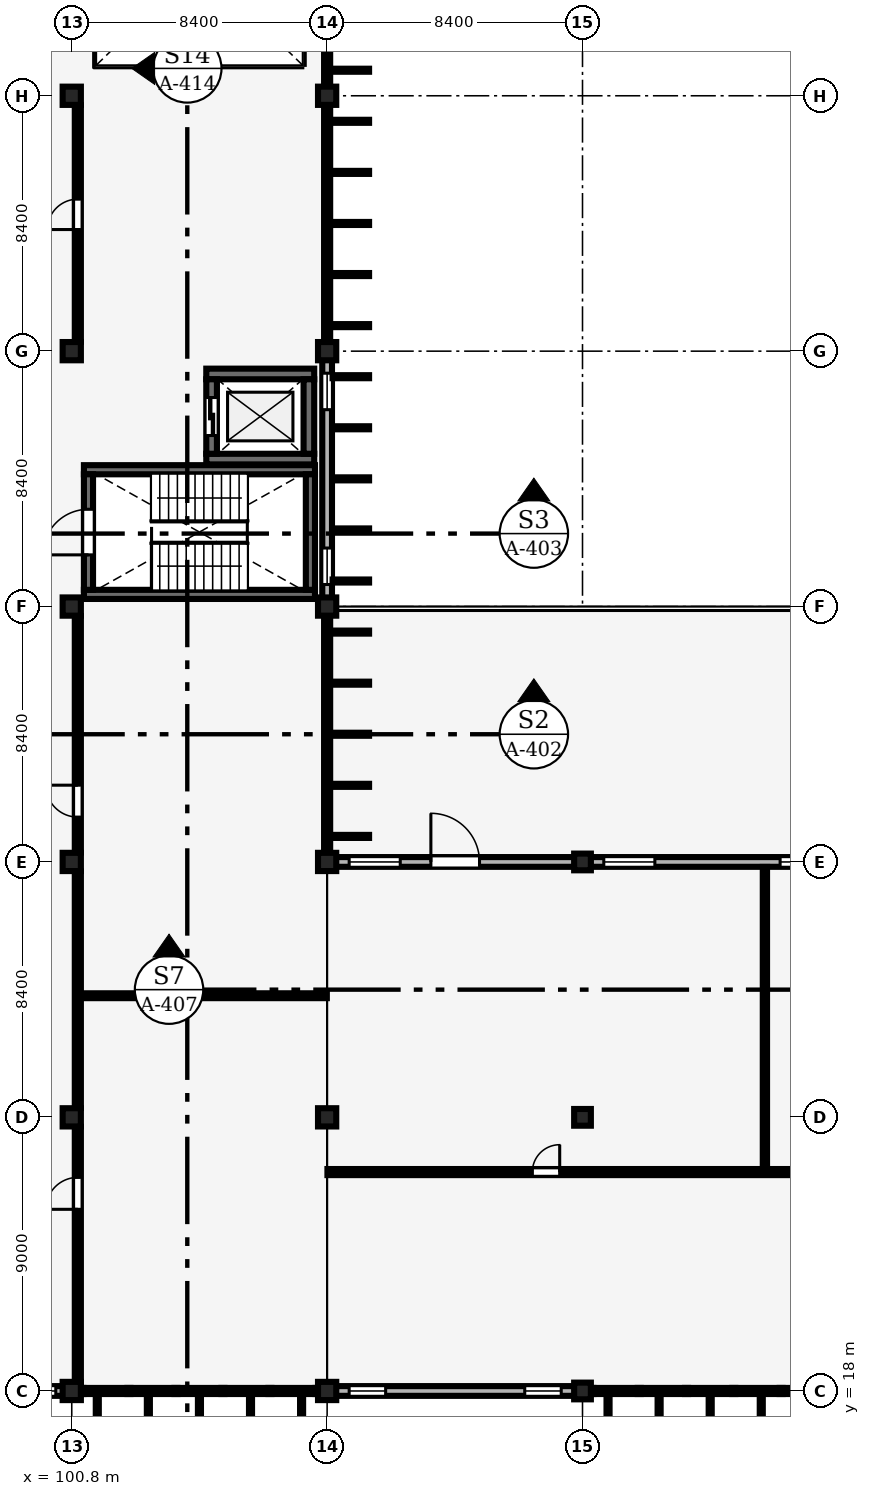
"""IFC4 building model, lengths in metres.
Left out: names, types, materials, properties, quantities, classifications, styles, units other than length and angle.
Written with IfcOpenShell. Run it as: python <this file> out.ifc"""

import sys

from ifc_helpers import new_model, si_unit, direction, frame, frame_2d, origin, origin_2d, place, context, subcontext, project, spatial, rectangle, extrude, element, fill, save


model = new_model("IFC4")
c1 = context("Model", 3, precision=1e-05, world=origin(), true_north=direction((0.0, 1.0)))
c2 = subcontext(c1, "Body", "Model", "MODEL_VIEW")
j1 = project(units=[si_unit("LENGTHUNIT", "METRE"), si_unit("PLANEANGLEUNIT", "RADIAN")], contexts=[c1])
p1 = place(None, origin())
s1 = spatial("IfcSite", under=j1, at=p1, CompositionType="ELEMENT")
p2 = place(p1, origin())
s2 = spatial("IfcBuilding", under=s1, at=p2, CompositionType="ELEMENT")
p3 = place(p2, frame((0.0, 0.0, 9.0)))
s3 = spatial("IfcBuildingStorey", under=s2, at=p3, CompositionType="ELEMENT", Elevation=9.0)
for number, where, z_axis, x_axis in (
    (1, (100.8, 18.0, 0.0), (0.0, 0.0, 1.0), (1.0, 0.0, 0.0)),
    (2, (100.8, 27.0, 0.0), (0.0, 0.0, 1.0), (1.0, 0.0, 0.0)),
    (3, (100.8, 35.4, 0.0), (0.0, 0.0, 1.0), (1.0, 0.0, 0.0)),
    (4, (100.8, 43.8, 0.0), (0.0, 0.0, 1.0), (1.0, 0.0, 0.0)),
    (5, (100.8, 52.2, 0.0), (0.0, 0.0, 1.0), (1.0, 0.0, 0.0)),
    (6, (100.8, 60.6, 0.0), (0.0, 0.0, 1.0), (1.0, 0.0, 0.0)),
    (7, (109.2, 18.0, 0.0), (0.0, 0.0, 1.0), (1.0, 0.0, 0.0)),
    (8, (109.2, 27.0, 0.0), (0.0, 0.0, 1.0), (1.0, 0.0, 0.0)),
    (9, (109.2, 35.4, 0.0), (0.0, 0.0, 1.0), (1.0, 0.0, 0.0)),
    (10, (109.2, 43.8, 0.0), (0.0, 0.0, 1.0), (1.0, 0.0, 0.0)),
    (11, (109.2, 52.2, 0.0), (0.0, 0.0, 1.0), (1.0, 0.0, 0.0)),
    (12, (109.2, 60.6, 0.0), (0.0, 0.0, 1.0), (1.0, 0.0, 0.0)),
):
    element("IfcColumn", number, at=place(p3, frame(where, z_axis=z_axis, x_axis=x_axis)), inside=s3, PredefinedType="COLUMN", context=c2, shape_type="SweptSolid", body=[
        extrude(rectangle(XDim=0.6, YDim=0.6, at=origin_2d()), origin(), (0.0, 0.0, 1.0), 4.2),
    ])
for number, where, z_axis, x_axis in (
    (13, (117.6, 18.0, 0.0), (0.0, 0.0, 1.0), (1.0, 0.0, 0.0)),
    (14, (117.6, 27.0, 0.0), (0.0, 0.0, 1.0), (1.0, 0.0, 0.0)),
    (15, (117.6, 35.4, 0.0), (0.0, 0.0, 1.0), (1.0, 0.0, 0.0)),
):
    element("IfcColumn", number, at=place(p3, frame(where, z_axis=z_axis, x_axis=x_axis)), inside=s3, PredefinedType="COLUMN", context=c2, shape_type="SweptSolid", body=[
        extrude(rectangle(XDim=0.55, YDim=0.55, at=origin_2d()), origin(), (0.0, 0.0, 1.0), 4.2),
    ])
p4 = place(p3, frame((109.475, 35.4, 0.0), z_axis=(0.0, 0.0, 1.0), x_axis=(1.0, 0.0, 0.0)))
e16 = element("IfcWall", 16, at=p4, inside=s3, PredefinedType="SOLIDWALL", context=c2, shape_type="SweptSolid", body=[
    extrude(rectangle(XDim=7.875, YDim=0.32, at=frame_2d((3.938, 0.0))), origin(), (0.0, 0.0, 1.0), 3.48),
])
p5 = place(p4, frame((3.137, 0.0, 0.0)))
e17 = element("IfcOpeningElement", 17, at=p5, cuts=e16, PredefinedType="OPENING", context=c2, shape_type="SweptSolid", body=[
    extrude(rectangle(XDim=1.6, YDim=2.3, at=frame_2d((0.8, 1.15))), frame((0.0, 0.17, 0.0), z_axis=(0.0, -1.0, 0.0), x_axis=(1.0, 0.0, 0.0)), (0.0, 0.0, 1.0), 0.34),
])
p6 = place(p4, frame((0.45, 0.0, 0.95)))
e18 = element("IfcOpeningElement", 18, at=p6, cuts=e16, PredefinedType="OPENING", context=c2, shape_type="SweptSolid", body=[
    extrude(rectangle(XDim=1.68, YDim=1.8, at=frame_2d((0.84, 0.9))), frame((0.0, 0.17, 0.0), z_axis=(0.0, -1.0, 0.0), x_axis=(1.0, 0.0, 0.0)), (0.0, 0.0, 1.0), 0.34),
])
p7 = place(p3, frame((117.85, 35.4, 0.0), z_axis=(0.0, 0.0, 1.0), x_axis=(1.0, 0.0, 0.0)))
e19 = element("IfcWall", 19, at=p7, inside=s3, PredefinedType="SOLIDWALL", context=c2, shape_type="SweptSolid", body=[
    extrude(rectangle(XDim=7.9, YDim=0.32, at=frame_2d((3.95, 0.0))), origin(), (0.0, 0.0, 1.0), 3.43),
])
p8 = place(p7, frame((0.45, 0.0, 0.9)))
e20 = element("IfcOpeningElement", 20, at=p8, cuts=e19, PredefinedType="OPENING", context=c2, shape_type="SweptSolid", body=[
    extrude(rectangle(XDim=1.68, YDim=2.4, at=frame_2d((0.84, 1.2))), frame((0.0, 0.17, 0.0), z_axis=(0.0, -1.0, 0.0), x_axis=(1.0, 0.0, 0.0)), (0.0, 0.0, 1.0), 0.34),
])
p9 = place(p7, frame((6.25, 0.0, 0.9)))
e21 = element("IfcOpeningElement", 21, at=p9, cuts=e19, PredefinedType="OPENING", context=c2, shape_type="SweptSolid", body=[
    extrude(rectangle(XDim=1.2, YDim=1.5, at=frame_2d((0.6, 0.75))), frame((0.0, 0.17, 0.0), z_axis=(0.0, -1.0, 0.0), x_axis=(1.0, 0.0, 0.0)), (0.0, 0.0, 1.0), 0.34),
])
p10 = place(p3, frame((109.2, 44.075, 0.0), z_axis=(0.0, 0.0, 1.0), x_axis=(0.0, 1.0, 0.0)))
e22 = element("IfcWall", 22, at=p10, inside=s3, PredefinedType="SOLIDWALL", context=c2, shape_type="SweptSolid", body=[
    extrude(rectangle(XDim=7.85, YDim=0.32, at=frame_2d((3.925, 0.0))), origin(), (0.0, 0.0, 1.0), 3.34),
])
p11 = place(p10, frame((0.45, 0.0, 0.85)))
e23 = element("IfcOpeningElement", 23, at=p11, cuts=e22, PredefinedType="OPENING", context=c2, shape_type="SweptSolid", body=[
    extrude(rectangle(XDim=1.2, YDim=1.8, at=frame_2d((0.6, 0.9))), frame((0.0, 0.17, 0.0), z_axis=(0.0, -1.0, 0.0), x_axis=(1.0, 0.0, 0.0)), (0.0, 0.0, 1.0), 0.34),
])
p12 = place(p10, frame((6.2, 0.0, 0.85)))
e24 = element("IfcOpeningElement", 24, at=p12, cuts=e22, PredefinedType="OPENING", context=c2, shape_type="SweptSolid", body=[
    extrude(rectangle(XDim=1.2, YDim=1.8, at=frame_2d((0.6, 0.9))), frame((0.0, 0.17, 0.0), z_axis=(0.0, -1.0, 0.0), x_axis=(1.0, 0.0, 0.0)), (0.0, 0.0, 1.0), 0.34),
])
p13 = place(p3, frame((92.675, 18.0, 0.0), z_axis=(0.0, 0.0, 1.0), x_axis=(1.0, 0.0, 0.0)))
e25 = element("IfcWall", 25, at=p13, inside=s3, PredefinedType="SOLIDWALL", context=c2, shape_type="SweptSolid", body=[
    extrude(rectangle(XDim=7.85, YDim=0.32, at=frame_2d((3.925, 0.0))), origin(), (0.0, 0.0, 1.0), 3.18),
])
p14 = place(p13, frame((0.45, 0.0, 0.9)))
e26 = element("IfcOpeningElement", 26, at=p14, cuts=e25, PredefinedType="OPENING", context=c2, shape_type="SweptSolid", body=[
    extrude(rectangle(XDim=1.2, YDim=1.8, at=frame_2d((0.6, 0.9))), frame((0.0, 0.17, 0.0), z_axis=(0.0, -1.0, 0.0), x_axis=(1.0, 0.0, 0.0)), (0.0, 0.0, 1.0), 0.34),
])
p15 = place(p13, frame((5.92, 0.0, 0.9)))
e27 = element("IfcOpeningElement", 27, at=p15, cuts=e25, PredefinedType="OPENING", context=c2, shape_type="SweptSolid", body=[
    extrude(rectangle(XDim=1.68, YDim=2.13, at=frame_2d((0.84, 1.065))), frame((0.0, 0.17, 0.0), z_axis=(0.0, -1.0, 0.0), x_axis=(1.0, 0.0, 0.0)), (0.0, 0.0, 1.0), 0.34),
])
p16 = place(p3, frame((109.475, 18.0, 0.0), z_axis=(0.0, 0.0, 1.0), x_axis=(1.0, 0.0, 0.0)))
e28 = element("IfcWall", 28, at=p16, inside=s3, PredefinedType="SOLIDWALL", context=c2, shape_type="SweptSolid", body=[
    extrude(rectangle(XDim=7.875, YDim=0.32, at=frame_2d((3.938, 0.0))), origin(), (0.0, 0.0, 1.0), 3.43),
])
p17 = place(p16, frame((0.45, 0.0, 0.9)))
e29 = element("IfcOpeningElement", 29, at=p17, cuts=e28, PredefinedType="OPENING", context=c2, shape_type="SweptSolid", body=[
    extrude(rectangle(XDim=1.2, YDim=1.5, at=frame_2d((0.6, 0.75))), frame((0.0, 0.17, 0.0), z_axis=(0.0, -1.0, 0.0), x_axis=(1.0, 0.0, 0.0)), (0.0, 0.0, 1.0), 0.34),
])
p18 = place(p16, frame((6.225, 0.0, 0.9)))
e30 = element("IfcOpeningElement", 30, at=p18, cuts=e28, PredefinedType="OPENING", context=c2, shape_type="SweptSolid", body=[
    extrude(rectangle(XDim=1.2, YDim=1.8, at=frame_2d((0.6, 0.9))), frame((0.0, 0.17, 0.0), z_axis=(0.0, -1.0, 0.0), x_axis=(1.0, 0.0, 0.0)), (0.0, 0.0, 1.0), 0.34),
])
for number, where, z_axis, x_axis in (
    (31, (101.2, 44.2, 0.0), (0.0, 0.0, 1.0), (1.0, 0.0, 0.0)),
    (32, (101.2, 48.3, 0.0), (0.0, 0.0, 1.0), (1.0, 0.0, 0.0)),
):
    element("IfcWall", number, at=place(p3, frame(where, z_axis=z_axis, x_axis=x_axis)), inside=s3, PredefinedType="SHEAR", context=c2, shape_type="SweptSolid", body=[
        extrude(rectangle(XDim=7.6, YDim=0.3, at=frame_2d((3.8, 0.0))), origin(), (0.0, 0.0, 1.0), 4.025),
    ])
p19 = place(p3, frame((101.35, 44.35, 0.0), z_axis=(0.0, 0.0, 1.0), x_axis=(0.0, 1.0, 0.0)))
e33 = element("IfcWall", 33, at=p19, inside=s3, PredefinedType="SHEAR", context=c2, shape_type="SweptSolid", body=[
    extrude(rectangle(XDim=3.8, YDim=0.3, at=frame_2d((1.9, 0.0))), origin(), (0.0, 0.0, 1.0), 4.025),
])
p20 = place(p19, frame((1.15, 0.0, 0.0)))
e34 = element("IfcOpeningElement", 34, at=p20, cuts=e33, PredefinedType="OPENING", context=c2, shape_type="SweptSolid", body=[
    extrude(rectangle(XDim=1.5, YDim=2.2, at=frame_2d((0.75, 1.1))), frame((0.0, 0.16, 0.0), z_axis=(0.0, -1.0, 0.0), x_axis=(1.0, 0.0, 0.0)), (0.0, 0.0, 1.0), 0.32),
])
p21 = place(p3, frame((108.65, 44.35, 0.0), z_axis=(0.0, 0.0, 1.0), x_axis=(0.0, 1.0, 0.0)))
e35 = element("IfcWall", 35, at=p21, inside=s3, PredefinedType="SHEAR", context=c2, shape_type="SweptSolid", body=[
    extrude(rectangle(XDim=3.8, YDim=0.3, at=frame_2d((1.9, 0.0))), origin(), (0.0, 0.0, 1.0), 4.025),
])
for number, where, z_axis, x_axis in (
    (36, (105.225, 48.65, 0.0), (0.0, 0.0, 1.0), (1.0, 0.0, 0.0)),
    (37, (105.225, 51.45, 0.0), (0.0, 0.0, 1.0), (1.0, 0.0, 0.0)),
):
    element("IfcWall", number, at=place(p3, frame(where, z_axis=z_axis, x_axis=x_axis)), inside=s3, PredefinedType="SHEAR", context=c2, shape_type="SweptSolid", body=[
        extrude(rectangle(XDim=3.55, YDim=0.35, at=frame_2d((1.775, 0.0))), origin(), (0.0, 0.0, 1.0), 3.92),
    ])
p22 = place(p3, frame((105.4, 48.825, 0.0), z_axis=(0.0, 0.0, 1.0), x_axis=(0.0, 1.0, 0.0)))
e38 = element("IfcWall", 38, at=p22, inside=s3, PredefinedType="SHEAR", context=c2, shape_type="SweptSolid", body=[
    extrude(rectangle(XDim=2.45, YDim=0.35, at=frame_2d((1.225, 0.0))), origin(), (0.0, 0.0, 1.0), 3.92),
])
p23 = place(p22, frame((0.6, 0.0, 0.0)))
e39 = element("IfcOpeningElement", 39, at=p23, cuts=e38, PredefinedType="OPENING", context=c2, shape_type="SweptSolid", body=[
    extrude(rectangle(XDim=1.25, YDim=2.25, at=frame_2d((0.625, 1.125))), frame((0.0, 0.185, 0.0), z_axis=(0.0, -1.0, 0.0), x_axis=(1.0, 0.0, 0.0)), (0.0, 0.0, 1.0), 0.37),
])
p24 = place(p3, frame((108.6, 48.825, 0.0), z_axis=(0.0, 0.0, 1.0), x_axis=(0.0, 1.0, 0.0)))
e40 = element("IfcWall", 40, at=p24, inside=s3, PredefinedType="SHEAR", context=c2, shape_type="SweptSolid", body=[
    extrude(rectangle(XDim=2.45, YDim=0.35, at=frame_2d((1.225, 0.0))), origin(), (0.0, 0.0, 1.0), 3.92),
])
p25 = place(p3, frame((101.105, 31.0, 0.0), z_axis=(0.0, 0.0, 1.0), x_axis=(1.0, 0.0, 0.0)))
e41 = element("IfcWall", 41, at=p25, inside=s3, PredefinedType="PARTITIONING", context=c2, shape_type="SweptSolid", body=[
    extrude(rectangle(XDim=8.085, YDim=0.16, at=frame_2d((4.042, 0.0))), origin(), (0.0, 0.0, 1.0), 3.9),
])
p26 = place(p3, frame((101.0, 18.105, 0.0), z_axis=(0.0, 0.0, 1.0), x_axis=(0.0, 1.0, 0.0)))
e42 = element("IfcWall", 42, at=p26, inside=s3, PredefinedType="PARTITIONING", context=c2, shape_type="SweptSolid", body=[
    extrude(rectangle(XDim=8.585, YDim=0.2, at=frame_2d((4.292, 0.0))), origin(), (0.0, 0.0, 1.0), 3.18),
])
p27 = place(p26, frame((5.87, 0.0, 0.0)))
e43 = element("IfcOpeningElement", 43, at=p27, cuts=e42, PredefinedType="OPENING", context=c2, shape_type="SweptSolid", body=[
    extrude(rectangle(XDim=1.05, YDim=2.2, at=frame_2d((0.525, 1.1))), frame((0.0, 0.11, 0.0), z_axis=(0.0, -1.0, 0.0), x_axis=(1.0, 0.0, 0.0)), (0.0, 0.0, 1.0), 0.22),
])
p28 = place(p3, frame((101.0, 27.31, 0.0), z_axis=(0.0, 0.0, 1.0), x_axis=(0.0, 1.0, 0.0)))
e44 = element("IfcWall", 44, at=p28, inside=s3, PredefinedType="PARTITIONING", context=c2, shape_type="SweptSolid", body=[
    extrude(rectangle(XDim=7.78, YDim=0.2, at=frame_2d((3.89, 0.0))), origin(), (0.0, 0.0, 1.0), 3.13),
])
p29 = place(p3, frame((101.0, 35.71, 0.0), z_axis=(0.0, 0.0, 1.0), x_axis=(0.0, 1.0, 0.0)))
e45 = element("IfcWall", 45, at=p29, inside=s3, PredefinedType="PARTITIONING", context=c2, shape_type="SweptSolid", body=[
    extrude(rectangle(XDim=7.78, YDim=0.2, at=frame_2d((3.89, 0.0))), origin(), (0.0, 0.0, 1.0), 3.14),
])
p30 = place(p29, frame((1.165, 0.0, 0.0)))
e46 = element("IfcOpeningElement", 46, at=p30, cuts=e45, PredefinedType="OPENING", context=c2, shape_type="SweptSolid", body=[
    extrude(rectangle(XDim=1.05, YDim=2.2, at=frame_2d((0.525, 1.1))), frame((0.0, 0.11, 0.0), z_axis=(0.0, -1.0, 0.0), x_axis=(1.0, 0.0, 0.0)), (0.0, 0.0, 1.0), 0.22),
])
p31 = place(p3, frame((101.0, 52.51, 0.0), z_axis=(0.0, 0.0, 1.0), x_axis=(0.0, 1.0, 0.0)))
e47 = element("IfcWall", 47, at=p31, inside=s3, PredefinedType="PARTITIONING", context=c2, shape_type="SweptSolid", body=[
    extrude(rectangle(XDim=7.78, YDim=0.2, at=frame_2d((3.89, 0.0))), origin(), (0.0, 0.0, 1.0), 3.14),
])
p32 = place(p31, frame((3.69, 0.0, 0.0)))
e48 = element("IfcOpeningElement", 48, at=p32, cuts=e47, PredefinedType="OPENING", context=c2, shape_type="SweptSolid", body=[
    extrude(rectangle(XDim=1.0, YDim=2.15, at=frame_2d((0.5, 1.075))), frame((0.0, 0.11, 0.0), z_axis=(0.0, -1.0, 0.0), x_axis=(1.0, 0.0, 0.0)), (0.0, 0.0, 1.0), 0.22),
])
p33 = place(p3, frame((123.6, 25.305, 0.0), z_axis=(0.0, 0.0, 1.0), x_axis=(0.0, 1.0, 0.0)))
e49 = element("IfcWall", 49, at=p33, inside=s3, PredefinedType="PARTITIONING", context=c2, shape_type="SweptSolid", body=[
    extrude(rectangle(XDim=9.93, YDim=0.14, at=frame_2d((4.965, 0.0))), origin(), (0.0, 0.0, 1.0), 3.9),
])
p34 = place(p3, frame((109.21, 25.2, 0.0), z_axis=(0.0, 0.0, 1.0), x_axis=(1.0, 0.0, 0.0)))
e50 = element("IfcWall", 50, at=p34, inside=s3, PredefinedType="PARTITIONING", context=c2, shape_type="SweptSolid", body=[
    extrude(rectangle(XDim=25.025, YDim=0.2, at=frame_2d((12.513, 0.0))), origin(), (0.0, 0.0, 1.0), 3.9),
])
p35 = place(p34, frame((6.74, 0.0, 0.0)))
e51 = element("IfcOpeningElement", 51, at=p35, cuts=e50, PredefinedType="OPENING", context=c2, shape_type="SweptSolid", body=[
    extrude(rectangle(XDim=0.9, YDim=2.1, at=frame_2d((0.45, 1.05))), frame((0.0, 0.11, 0.0), z_axis=(0.0, -1.0, 0.0), x_axis=(1.0, 0.0, 0.0)), (0.0, 0.0, 1.0), 0.22),
])
p36 = place(p34, frame((19.34, 0.0, 0.0)))
e52 = element("IfcOpeningElement", 52, at=p36, cuts=e50, PredefinedType="OPENING", context=c2, shape_type="SweptSolid", body=[
    extrude(rectangle(XDim=0.9, YDim=2.1, at=frame_2d((0.45, 1.05))), frame((0.0, 0.11, 0.0), z_axis=(0.0, -1.0, 0.0), x_axis=(1.0, 0.0, 0.0)), (0.0, 0.0, 1.0), 0.22),
])
p37 = place(p5, origin())
e53 = element("IfcDoor", 53, at=p37, inside=s3, OperationType="DOUBLE_DOOR_SINGLE_SWING", PredefinedType="DOOR", context=c2, shape_type="SweptSolid", body=[
    extrude(rectangle(XDim=1.6, YDim=2.3, at=frame_2d((0.8, 1.15))), frame((0.0, 0.025, 0.0), z_axis=(0.0, -1.0, 0.0), x_axis=(1.0, 0.0, 0.0)), (0.0, 0.0, 1.0), 0.05),
])
fill(e17, e53)
p38 = place(p6, origin())
e54 = element("IfcWindow", 54, at=p38, inside=s3, PartitioningType="SINGLE_PANEL", PredefinedType="WINDOW", context=c2, shape_type="SweptSolid", body=[
    extrude(rectangle(XDim=1.68, YDim=1.8, at=frame_2d((0.84, 0.9))), frame((0.0, 0.03, 0.0), z_axis=(0.0, -1.0, 0.0), x_axis=(1.0, 0.0, 0.0)), (0.0, 0.0, 1.0), 0.06),
])
fill(e18, e54)
p39 = place(p8, origin())
e55 = element("IfcWindow", 55, at=p39, inside=s3, PartitioningType="SINGLE_PANEL", PredefinedType="WINDOW", context=c2, shape_type="SweptSolid", body=[
    extrude(rectangle(XDim=1.68, YDim=2.4, at=frame_2d((0.84, 1.2))), frame((0.0, 0.03, 0.0), z_axis=(0.0, -1.0, 0.0), x_axis=(1.0, 0.0, 0.0)), (0.0, 0.0, 1.0), 0.06),
])
fill(e20, e55)
p40 = place(p9, origin())
e56 = element("IfcWindow", 56, at=p40, inside=s3, PartitioningType="SINGLE_PANEL", PredefinedType="WINDOW", context=c2, shape_type="SweptSolid", body=[
    extrude(rectangle(XDim=1.2, YDim=1.5, at=frame_2d((0.6, 0.75))), frame((0.0, 0.03, 0.0), z_axis=(0.0, -1.0, 0.0), x_axis=(1.0, 0.0, 0.0)), (0.0, 0.0, 1.0), 0.06),
])
fill(e21, e56)
p41 = place(p11, origin())
e57 = element("IfcWindow", 57, at=p41, inside=s3, PartitioningType="SINGLE_PANEL", PredefinedType="WINDOW", context=c2, shape_type="SweptSolid", body=[
    extrude(rectangle(XDim=1.2, YDim=1.8, at=frame_2d((0.6, 0.9))), frame((0.0, 0.03, 0.0), z_axis=(0.0, -1.0, 0.0), x_axis=(1.0, 0.0, 0.0)), (0.0, 0.0, 1.0), 0.06),
])
fill(e23, e57)
p42 = place(p12, origin())
e58 = element("IfcWindow", 58, at=p42, inside=s3, PartitioningType="SINGLE_PANEL", PredefinedType="WINDOW", context=c2, shape_type="SweptSolid", body=[
    extrude(rectangle(XDim=1.2, YDim=1.8, at=frame_2d((0.6, 0.9))), frame((0.0, 0.03, 0.0), z_axis=(0.0, -1.0, 0.0), x_axis=(1.0, 0.0, 0.0)), (0.0, 0.0, 1.0), 0.06),
])
fill(e24, e58)
p43 = place(p15, origin())
e59 = element("IfcWindow", 59, at=p43, inside=s3, PartitioningType="SINGLE_PANEL", PredefinedType="WINDOW", context=c2, shape_type="SweptSolid", body=[
    extrude(rectangle(XDim=1.68, YDim=2.13, at=frame_2d((0.84, 1.065))), frame((0.0, 0.03, 0.0), z_axis=(0.0, -1.0, 0.0), x_axis=(1.0, 0.0, 0.0)), (0.0, 0.0, 1.0), 0.06),
])
fill(e27, e59)
p44 = place(p17, origin())
e60 = element("IfcWindow", 60, at=p44, inside=s3, PartitioningType="SINGLE_PANEL", PredefinedType="WINDOW", context=c2, shape_type="SweptSolid", body=[
    extrude(rectangle(XDim=1.2, YDim=1.5, at=frame_2d((0.6, 0.75))), frame((0.0, 0.03, 0.0), z_axis=(0.0, -1.0, 0.0), x_axis=(1.0, 0.0, 0.0)), (0.0, 0.0, 1.0), 0.06),
])
fill(e29, e60)
p45 = place(p18, origin())
e61 = element("IfcWindow", 61, at=p45, inside=s3, PartitioningType="SINGLE_PANEL", PredefinedType="WINDOW", context=c2, shape_type="SweptSolid", body=[
    extrude(rectangle(XDim=1.2, YDim=1.8, at=frame_2d((0.6, 0.9))), frame((0.0, 0.03, 0.0), z_axis=(0.0, -1.0, 0.0), x_axis=(1.0, 0.0, 0.0)), (0.0, 0.0, 1.0), 0.06),
])
fill(e30, e61)
p46 = place(p20, origin())
e62 = element("IfcDoor", 62, at=p46, inside=s3, OperationType="DOUBLE_DOOR_SINGLE_SWING", PredefinedType="DOOR", context=c2, shape_type="SweptSolid", body=[
    extrude(rectangle(XDim=1.5, YDim=2.2, at=frame_2d((0.75, 1.1))), frame((0.0, 0.025, 0.0), z_axis=(0.0, -1.0, 0.0), x_axis=(1.0, 0.0, 0.0)), (0.0, 0.0, 1.0), 0.05),
])
fill(e34, e62)
p47 = place(p23, origin())
e63 = element("IfcDoor", 63, at=p47, inside=s3, OperationType="DOUBLE_DOOR_SLIDING", PredefinedType="DOOR", context=c2, shape_type="SweptSolid", body=[
    extrude(rectangle(XDim=1.25, YDim=2.25, at=frame_2d((0.625, 1.125))), frame((0.0, 0.025, 0.0), z_axis=(0.0, -1.0, 0.0), x_axis=(1.0, 0.0, 0.0)), (0.0, 0.0, 1.0), 0.05),
])
fill(e39, e63)
p48 = place(p27, origin())
e64 = element("IfcDoor", 64, at=p48, inside=s3, OperationType="SINGLE_SWING_LEFT", PredefinedType="DOOR", context=c2, shape_type="SweptSolid", body=[
    extrude(rectangle(XDim=1.05, YDim=2.2, at=frame_2d((0.525, 1.1))), frame((0.0, 0.025, 0.0), z_axis=(0.0, -1.0, 0.0), x_axis=(1.0, 0.0, 0.0)), (0.0, 0.0, 1.0), 0.05),
])
fill(e43, e64)
p49 = place(p30, origin())
e65 = element("IfcDoor", 65, at=p49, inside=s3, OperationType="SINGLE_SWING_RIGHT", PredefinedType="DOOR", context=c2, shape_type="SweptSolid", body=[
    extrude(rectangle(XDim=1.05, YDim=2.2, at=frame_2d((0.525, 1.1))), frame((0.0, 0.025, 0.0), z_axis=(0.0, -1.0, 0.0), x_axis=(1.0, 0.0, 0.0)), (0.0, 0.0, 1.0), 0.05),
])
fill(e46, e65)
p50 = place(p32, origin())
e66 = element("IfcDoor", 66, at=p50, inside=s3, OperationType="SINGLE_SWING_LEFT", PredefinedType="DOOR", context=c2, shape_type="SweptSolid", body=[
    extrude(rectangle(XDim=1.0, YDim=2.15, at=frame_2d((0.5, 1.075))), frame((0.0, 0.025, 0.0), z_axis=(0.0, -1.0, 0.0), x_axis=(1.0, 0.0, 0.0)), (0.0, 0.0, 1.0), 0.05),
])
fill(e48, e66)
p51 = place(p35, origin())
e67 = element("IfcDoor", 67, at=p51, inside=s3, OperationType="SINGLE_SWING_RIGHT", PredefinedType="DOOR", context=c2, shape_type="SweptSolid", body=[
    extrude(rectangle(XDim=0.9, YDim=2.1, at=frame_2d((0.45, 1.05))), frame((0.0, 0.025, 0.0), z_axis=(0.0, -1.0, 0.0), x_axis=(1.0, 0.0, 0.0)), (0.0, 0.0, 1.0), 0.05),
])
fill(e51, e67)
save(model, sys.argv[1])
